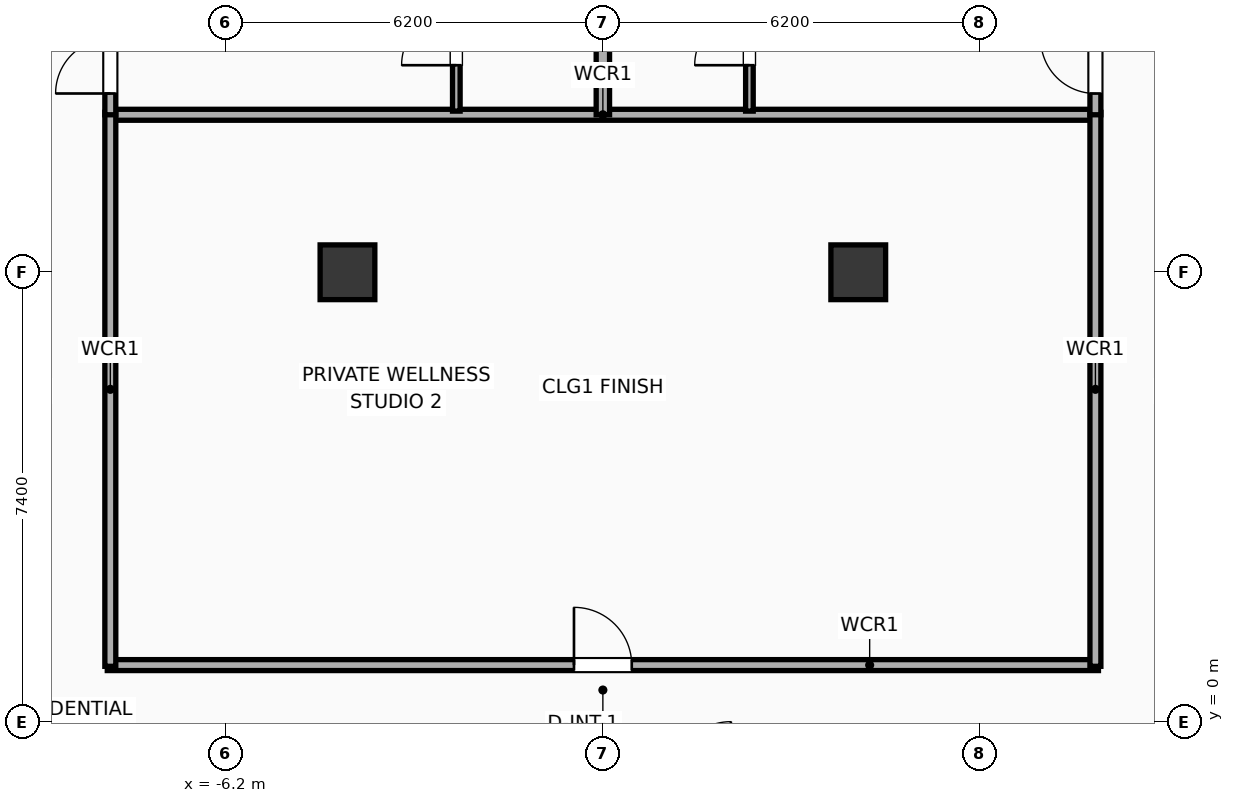
"""IFC4 building model, lengths in metres.
Left out: names, types, materials, properties, quantities, classifications, styles, units other than length and angle.
Written with IfcOpenShell. Run it as: python <this file> out.ifc"""

import sys

from ifc_helpers import new_model, si_unit, direction, frame, frame_2d, origin, origin_2d, place, context, subcontext, project, spatial, rectangle, extrude, element, fill, save


model = new_model("IFC4")
c1 = context("Model", 3, precision=1e-05, world=origin(), true_north=direction((0.0, 1.0)))
c2 = subcontext(c1, "Body", "Model", "MODEL_VIEW")
j1 = project(units=[si_unit("LENGTHUNIT", "METRE"), si_unit("PLANEANGLEUNIT", "RADIAN")], contexts=[c1])
p1 = place(None, origin())
s1 = spatial("IfcSite", under=j1, at=p1, CompositionType="ELEMENT")
p2 = place(p1, origin())
s2 = spatial("IfcBuilding", under=s1, at=p2, CompositionType="ELEMENT")
p3 = place(p2, frame((0.0, 0.0, 171.6)))
s3 = spatial("IfcBuildingStorey", under=s2, at=p3, CompositionType="ELEMENT", Elevation=171.6)
for number, where, z_axis, x_axis in (
    (1, (-4.2, 7.4, 0.0), (0.0, 0.0, 1.0), (1.0, 0.0, 0.0)),
    (2, (4.2, 7.4, 0.0), (0.0, 0.0, 1.0), (1.0, 0.0, 0.0)),
):
    element("IfcColumn", number, at=place(p3, frame(where, z_axis=z_axis, x_axis=x_axis)), inside=s3, PredefinedType="COLUMN", context=c2, shape_type="SweptSolid", body=[
        extrude(rectangle(XDim=0.9, YDim=0.9, at=origin_2d()), origin(), (0.0, 0.0, 1.0), 3.9),
    ])
p4 = place(p3, frame((-8.15, 9.99, 0.0), z_axis=(0.0, 0.0, 1.0), x_axis=(1.0, 0.0, 0.0)))
e3 = element("IfcWall", 3, at=p4, inside=s3, PredefinedType="PARTITIONING", context=c2, shape_type="SweptSolid", body=[
    extrude(rectangle(XDim=16.3, YDim=0.18, at=frame_2d((8.15, 0.0))), origin(), (0.0, 0.0, 1.0), 3.65),
])
p5 = place(p3, frame((-8.15, 0.94, 0.0), z_axis=(0.0, 0.0, 1.0), x_axis=(1.0, 0.0, 0.0)))
e4 = element("IfcWall", 4, at=p5, inside=s3, PredefinedType="PARTITIONING", context=c2, shape_type="SweptSolid", body=[
    extrude(rectangle(XDim=16.3, YDim=0.18, at=frame_2d((8.15, 0.0))), origin(), (0.0, 0.0, 1.0), 3.65),
])
p6 = place(p5, frame((7.675, 0.0, 0.0)))
e5 = element("IfcOpeningElement", 5, at=p6, cuts=e4, PredefinedType="OPENING", context=c2, shape_type="SweptSolid", body=[
    extrude(rectangle(XDim=0.95, YDim=2.05, at=frame_2d((0.475, 1.025))), frame((0.0, 0.1, 0.0), z_axis=(0.0, -1.0, 0.0), x_axis=(1.0, 0.0, 0.0)), (0.0, 0.0, 1.0), 0.2),
])
for number, where, z_axis, x_axis in (
    (6, (-8.1, 0.92, 0.0), (0.0, 0.0, 1.0), (0.0, 1.0, 0.0)),
    (7, (8.1, 0.92, 0.0), (0.0, 0.0, 1.0), (0.0, 1.0, 0.0)),
):
    element("IfcWall", number, at=place(p3, frame(where, z_axis=z_axis, x_axis=x_axis)), inside=s3, PredefinedType="PARTITIONING", context=c2, shape_type="SweptSolid", body=[
        extrude(rectangle(XDim=9.11, YDim=0.18, at=frame_2d((4.555, 0.0))), origin(), (0.0, 0.0, 1.0), 3.65),
    ])
p7 = place(p3, frame((-2.41, 10.05, 0.0), z_axis=(0.0, 0.0, 1.0), x_axis=(0.0, 1.0, 0.0)))
e8 = element("IfcWall", 8, at=p7, inside=s3, PredefinedType="PARTITIONING", context=c2, shape_type="SweptSolid", body=[
    extrude(rectangle(XDim=2.41, YDim=0.125, at=frame_2d((1.205, 0.0))), origin(), (0.0, 0.0, 1.0), 3.04),
])
p8 = place(p7, frame((0.755, 0.0, 0.0)))
e9 = element("IfcOpeningElement", 9, at=p8, cuts=e8, PredefinedType="OPENING", context=c2, shape_type="SweptSolid", body=[
    extrude(rectangle(XDim=0.9, YDim=2.05, at=frame_2d((0.45, 1.025))), frame((0.0, 0.073, 0.0), z_axis=(0.0, -1.0, 0.0), x_axis=(1.0, 0.0, 0.0)), (0.0, 0.0, 1.0), 0.145),
])
p9 = place(p3, frame((-8.1, 9.99, 0.0), z_axis=(0.0, 0.0, 1.0), x_axis=(0.0, 1.0, 0.0)))
e10 = element("IfcWall", 10, at=p9, inside=s3, PredefinedType="PARTITIONING", context=c2, shape_type="SweptSolid", body=[
    extrude(rectangle(XDim=9.236, YDim=0.18, at=frame_2d((4.618, 0.0))), origin(), (0.0, 0.0, 1.0), 3.65),
])
p10 = place(p9, frame((0.35, 0.0, 0.0)))
e11 = element("IfcOpeningElement", 11, at=p10, cuts=e10, PredefinedType="OPENING", context=c2, shape_type="SweptSolid", body=[
    extrude(rectangle(XDim=0.9, YDim=2.05, at=frame_2d((0.45, 1.025))), frame((0.0, 0.1, 0.0), z_axis=(0.0, -1.0, 0.0), x_axis=(1.0, 0.0, 0.0)), (0.0, 0.0, 1.0), 0.2),
])
p11 = place(p3, frame((2.41, 10.05, 0.0), z_axis=(0.0, 0.0, 1.0), x_axis=(0.0, 1.0, 0.0)))
e12 = element("IfcWall", 12, at=p11, inside=s3, PredefinedType="PARTITIONING", context=c2, shape_type="SweptSolid", body=[
    extrude(rectangle(XDim=2.41, YDim=0.125, at=frame_2d((1.205, 0.0))), origin(), (0.0, 0.0, 1.0), 3.65),
])
p12 = place(p11, frame((0.755, 0.0, 0.0)))
e13 = element("IfcOpeningElement", 13, at=p12, cuts=e12, PredefinedType="OPENING", context=c2, shape_type="SweptSolid", body=[
    extrude(rectangle(XDim=0.9, YDim=2.05, at=frame_2d((0.45, 1.025))), frame((0.0, 0.073, 0.0), z_axis=(0.0, -1.0, 0.0), x_axis=(1.0, 0.0, 0.0)), (0.0, 0.0, 1.0), 0.145),
])
p13 = place(p3, frame((8.1, 9.99, 0.0), z_axis=(0.0, 0.0, 1.0), x_axis=(0.0, 1.0, 0.0)))
e14 = element("IfcWall", 14, at=p13, inside=s3, PredefinedType="PARTITIONING", context=c2, shape_type="SweptSolid", body=[
    extrude(rectangle(XDim=10.939, YDim=0.18, at=frame_2d((5.47, 0.0))), origin(), (0.0, 0.0, 1.0), 3.65),
])
p14 = place(p13, frame((0.35, 0.0, 0.0)))
e15 = element("IfcOpeningElement", 15, at=p14, cuts=e14, PredefinedType="OPENING", context=c2, shape_type="SweptSolid", body=[
    extrude(rectangle(XDim=0.9, YDim=2.05, at=frame_2d((0.45, 1.025))), frame((0.0, 0.1, 0.0), z_axis=(0.0, -1.0, 0.0), x_axis=(1.0, 0.0, 0.0)), (0.0, 0.0, 1.0), 0.2),
])
p15 = place(p3, frame((0.0, 9.99, 0.0), z_axis=(0.0, 0.0, 1.0), x_axis=(0.0, 1.0, 0.0)))
e16 = element("IfcWall", 16, at=p15, inside=s3, PredefinedType="PARTITIONING", context=c2, shape_type="SweptSolid", body=[
    extrude(rectangle(XDim=10.088, YDim=0.22, at=frame_2d((5.044, 0.0))), origin(), (0.0, 0.0, 1.0), 3.04),
])
p16 = place(p6, origin())
e17 = element("IfcDoor", 17, at=p16, inside=s3, OperationType="SINGLE_SWING_LEFT", PredefinedType="DOOR", context=c2, shape_type="SweptSolid", body=[
    extrude(rectangle(XDim=0.95, YDim=2.05, at=frame_2d((0.475, 1.025))), frame((0.0, 0.025, 0.0), z_axis=(0.0, -1.0, 0.0), x_axis=(1.0, 0.0, 0.0)), (0.0, 0.0, 1.0), 0.05),
])
fill(e5, e17)
p17 = place(p8, origin())
e18 = element("IfcDoor", 18, at=p17, inside=s3, OperationType="SINGLE_SWING_LEFT", PredefinedType="DOOR", context=c2, shape_type="SweptSolid", body=[
    extrude(rectangle(XDim=0.9, YDim=2.05, at=frame_2d((0.45, 1.025))), frame((0.0, 0.025, 0.0), z_axis=(0.0, -1.0, 0.0), x_axis=(1.0, 0.0, 0.0)), (0.0, 0.0, 1.0), 0.05),
])
fill(e9, e18)
p18 = place(p10, origin())
e19 = element("IfcDoor", 19, at=p18, inside=s3, OperationType="SINGLE_SWING_LEFT", PredefinedType="DOOR", context=c2, shape_type="SweptSolid", body=[
    extrude(rectangle(XDim=0.9, YDim=2.05, at=frame_2d((0.45, 1.025))), frame((0.0, 0.025, 0.0), z_axis=(0.0, -1.0, 0.0), x_axis=(1.0, 0.0, 0.0)), (0.0, 0.0, 1.0), 0.05),
])
fill(e11, e19)
p19 = place(p12, origin())
e20 = element("IfcDoor", 20, at=p19, inside=s3, OperationType="SINGLE_SWING_LEFT", PredefinedType="DOOR", context=c2, shape_type="SweptSolid", body=[
    extrude(rectangle(XDim=0.9, YDim=2.05, at=frame_2d((0.45, 1.025))), frame((0.0, 0.025, 0.0), z_axis=(0.0, -1.0, 0.0), x_axis=(1.0, 0.0, 0.0)), (0.0, 0.0, 1.0), 0.05),
])
fill(e13, e20)
p20 = place(p14, origin())
e21 = element("IfcDoor", 21, at=p20, inside=s3, OperationType="SINGLE_SWING_RIGHT", PredefinedType="DOOR", context=c2, shape_type="SweptSolid", body=[
    extrude(rectangle(XDim=0.9, YDim=2.05, at=frame_2d((0.45, 1.025))), frame((0.0, 0.025, 0.0), z_axis=(0.0, -1.0, 0.0), x_axis=(1.0, 0.0, 0.0)), (0.0, 0.0, 1.0), 0.05),
])
fill(e15, e21)
save(model, sys.argv[1])
